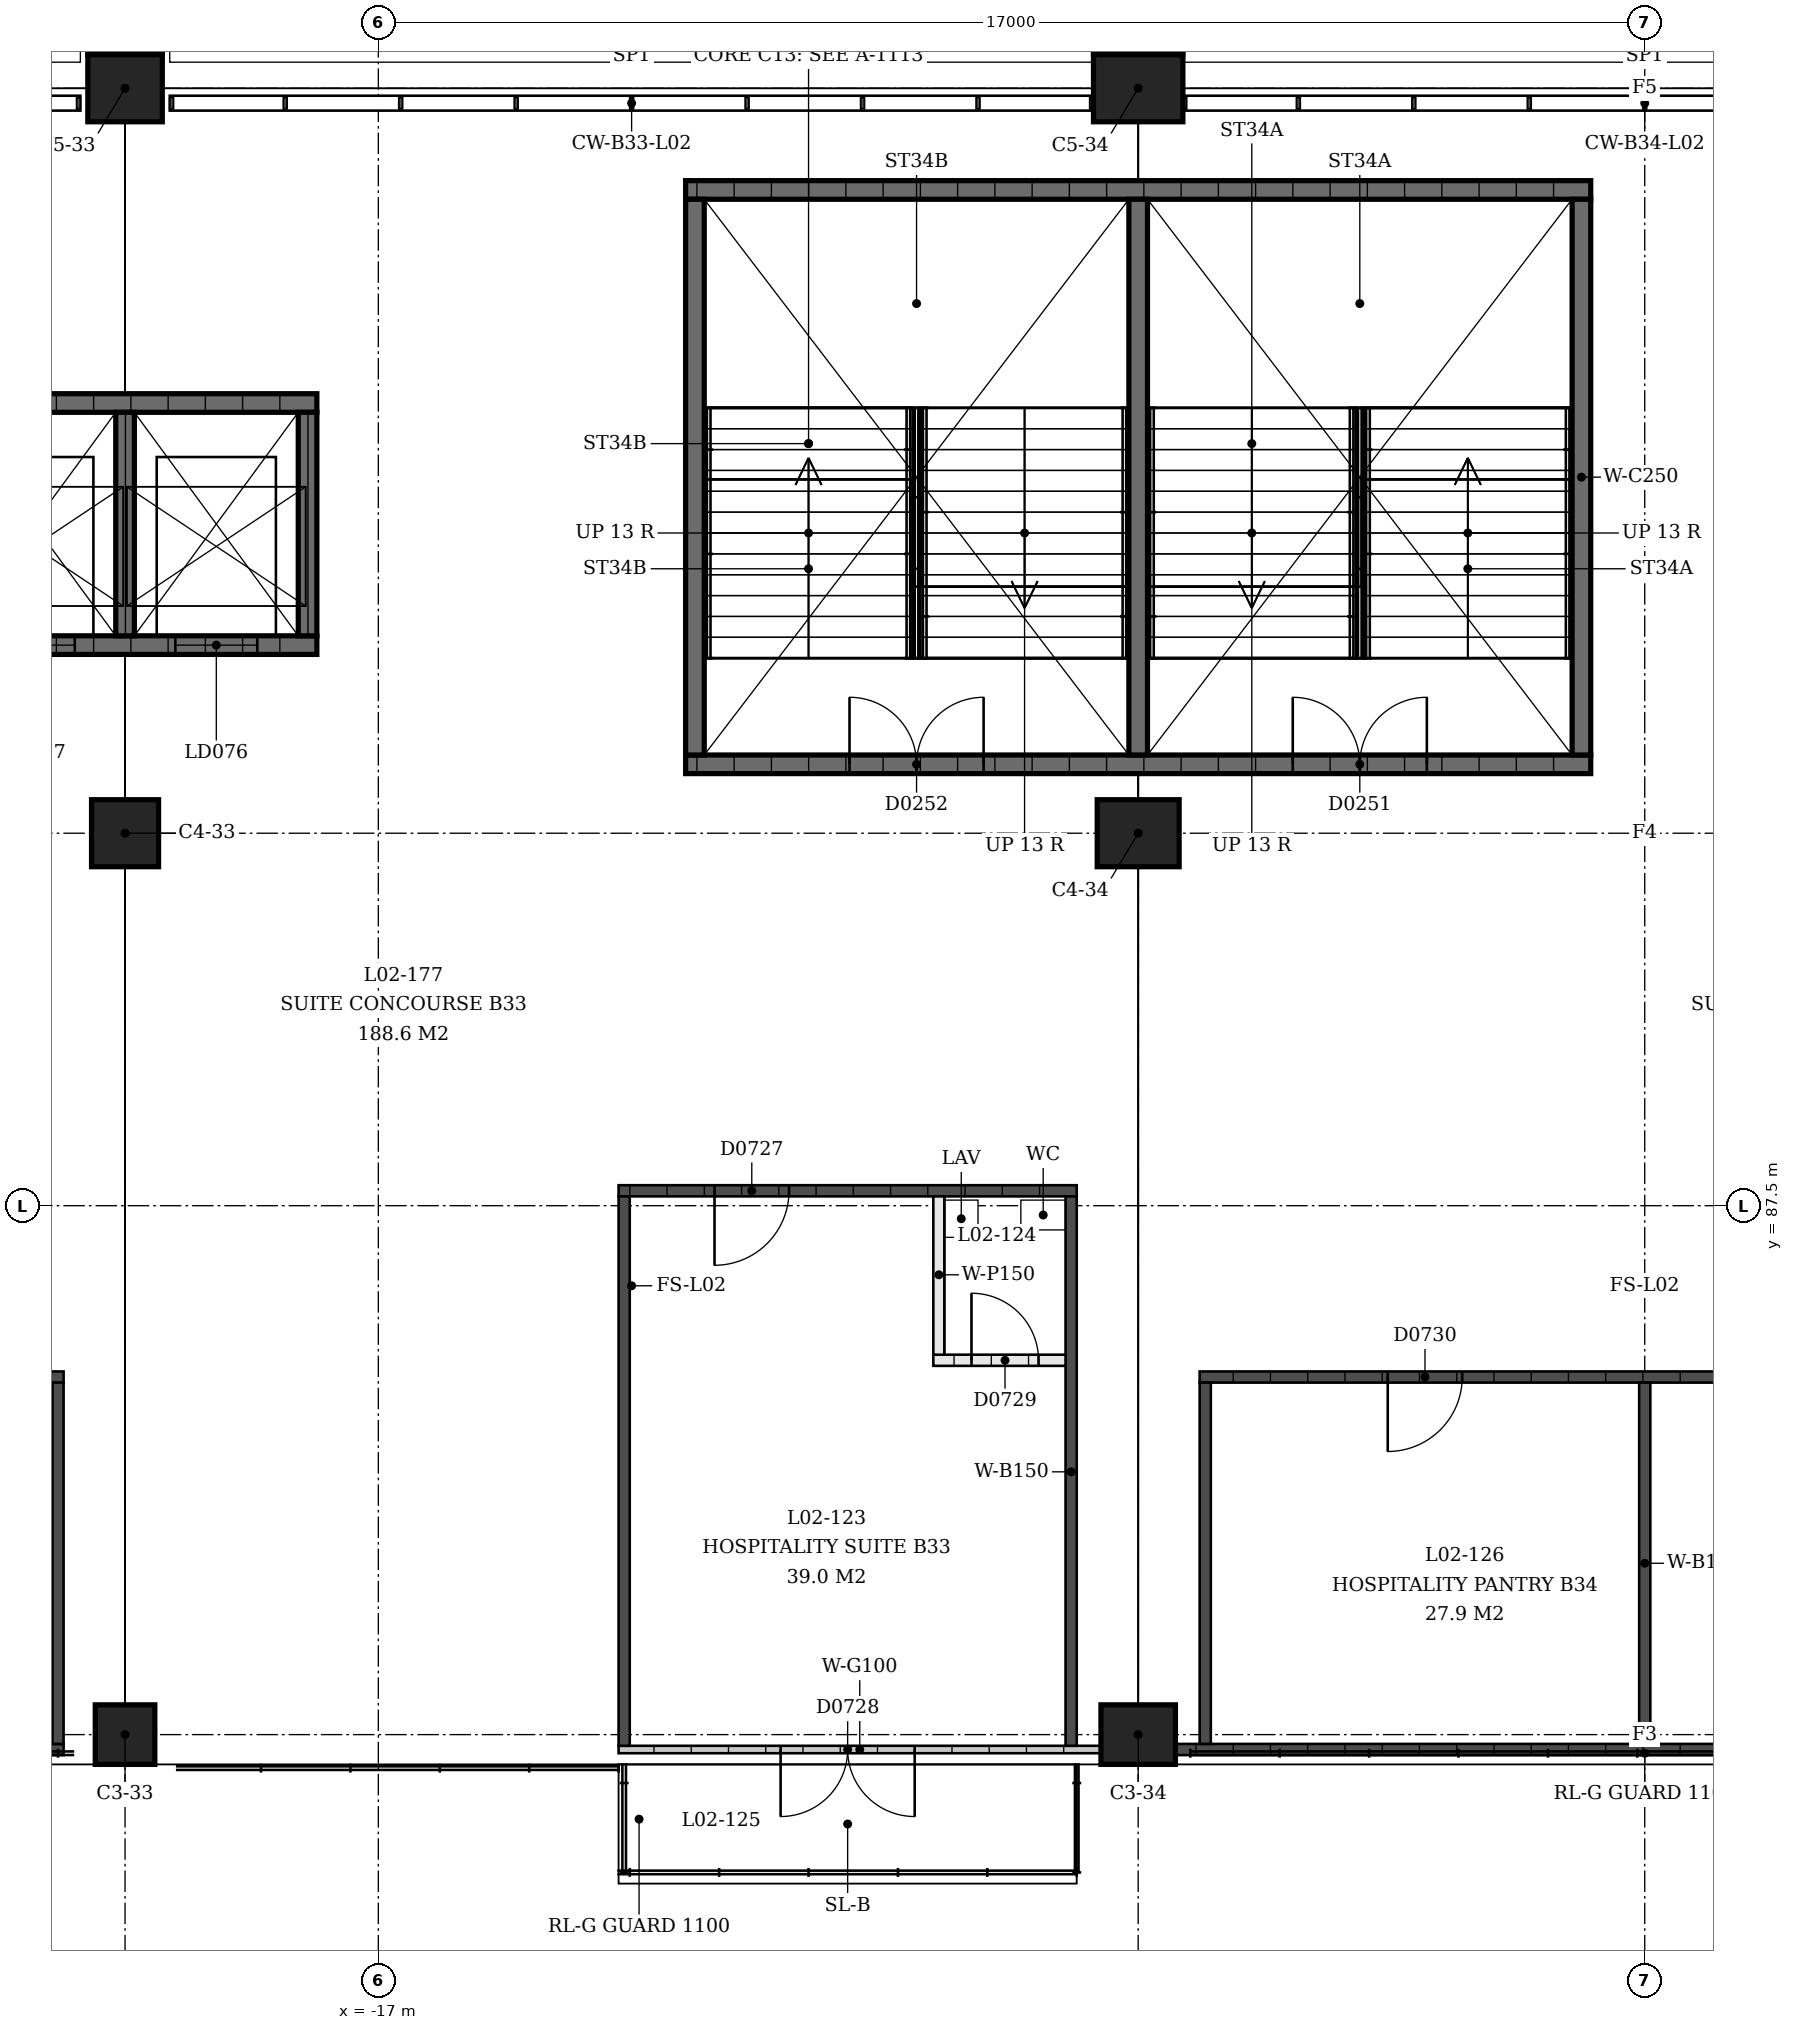
"""IFC4 building model, lengths in metres.
Left out: names, types, materials, properties, quantities, classifications, styles, units other than length and angle.
Written with IfcOpenShell. Run it as: python <this file> out.ifc"""

import sys

from ifc_helpers import new_model, si_unit, direction, frame, frame_2d, origin, origin_2d, place, context, subcontext, project, spatial, rectangle, extrude, element, fill, save


model = new_model("IFC4")
c1 = context("Model", 3, precision=1e-05, world=origin(), true_north=direction((0.0, 1.0)))
c2 = subcontext(c1, "Body", "Model", "MODEL_VIEW")
j1 = project(units=[si_unit("LENGTHUNIT", "METRE"), si_unit("PLANEANGLEUNIT", "RADIAN")], contexts=[c1])
p1 = place(None, origin())
s1 = spatial("IfcSite", under=j1, at=p1, CompositionType="ELEMENT")
p2 = place(p1, origin())
s2 = spatial("IfcBuilding", under=s1, at=p2, CompositionType="ELEMENT")
p3 = place(p2, frame((0.0, 0.0, 9.0)))
s3 = spatial("IfcBuildingStorey", under=s2, at=p3, CompositionType="ELEMENT", Elevation=9.0)
p4 = place(p3, frame((-20.4, 80.4, 0.0), z_axis=(0.0, 0.0, 1.0), x_axis=(-1.0, 0.0, 0.0)))
e1 = element("IfcColumn", 1, at=p4, inside=s3, PredefinedType="COLUMN", context=c2, shape_type="SweptSolid", body=[
    extrude(rectangle(XDim=0.8, YDim=0.8, at=origin_2d()), origin(), (0.0, 0.0, 1.0), 4.5),
])
p5 = place(p3, frame((-20.4, 92.5, 0.0), z_axis=(0.0, 0.0, 1.0), x_axis=(-1.0, 0.0, 0.0)))
e2 = element("IfcColumn", 2, at=p5, inside=s3, PredefinedType="COLUMN", context=c2, shape_type="SweptSolid", body=[
    extrude(rectangle(XDim=0.9, YDim=0.9, at=origin_2d()), origin(), (0.0, 0.0, 1.0), 4.5),
])
p6 = place(p3, frame((-20.4, 102.5, 0.0), z_axis=(0.0, 0.0, 1.0), x_axis=(-1.0, 0.0, 0.0)))
e3 = element("IfcColumn", 3, at=p6, inside=s3, PredefinedType="COLUMN", context=c2, shape_type="SweptSolid", body=[
    extrude(rectangle(XDim=1.0, YDim=0.9, at=origin_2d()), origin(), (0.0, 0.0, 1.0), 4.5),
])
p7 = place(p3, frame((-6.8, 80.4, 0.0), z_axis=(0.0, 0.0, 1.0), x_axis=(-1.0, 0.0, 0.0)))
e4 = element("IfcColumn", 4, at=p7, inside=s3, PredefinedType="COLUMN", context=c2, shape_type="SweptSolid", body=[
    extrude(rectangle(XDim=1.0, YDim=0.8, at=origin_2d()), origin(), (0.0, 0.0, 1.0), 4.5),
])
p8 = place(p3, frame((-6.8, 92.5, 0.0), z_axis=(0.0, 0.0, 1.0), x_axis=(-1.0, 0.0, 0.0)))
e5 = element("IfcColumn", 5, at=p8, inside=s3, PredefinedType="COLUMN", context=c2, shape_type="SweptSolid", body=[
    extrude(rectangle(XDim=1.1, YDim=0.9, at=origin_2d()), origin(), (0.0, 0.0, 1.0), 4.5),
])
p9 = place(p3, frame((-6.8, 102.5, 0.0), z_axis=(0.0, 0.0, 1.0), x_axis=(-1.0, 0.0, 0.0)))
e6 = element("IfcColumn", 6, at=p9, inside=s3, PredefinedType="COLUMN", context=c2, shape_type="SweptSolid", body=[
    extrude(rectangle(XDim=1.2, YDim=0.9, at=origin_2d()), origin(), (0.0, 0.0, 1.0), 4.5),
])
p10 = place(p3, frame((-0.725, 93.425, 0.0), z_axis=(0.0, 0.0, 1.0), x_axis=(-1.0, 0.0, 0.0)))
e7 = element("IfcWall", 7, at=p10, inside=s3, PredefinedType="SHEAR", context=c2, shape_type="SweptSolid", body=[
    extrude(rectangle(XDim=12.15, YDim=0.25, at=frame_2d((6.075, 0.0))), origin(), (0.0, 0.0, 1.0), 4.09),
])
p11 = place(p10, frame((2.2, 0.0, 0.0)))
e8 = element("IfcOpeningElement", 8, at=p11, cuts=e7, PredefinedType="OPENING", context=c2, shape_type="SweptSolid", body=[
    extrude(rectangle(XDim=1.8, YDim=2.1, at=frame_2d((0.9, 1.05))), frame((0.0, 0.125, 0.0), z_axis=(0.0, -1.0, 0.0), x_axis=(1.0, 0.0, 0.0)), (0.0, 0.0, 1.0), 0.25),
])
p12 = place(p10, frame((8.15, 0.0, 0.0)))
e9 = element("IfcOpeningElement", 9, at=p12, cuts=e7, PredefinedType="OPENING", context=c2, shape_type="SweptSolid", body=[
    extrude(rectangle(XDim=1.8, YDim=2.1, at=frame_2d((0.9, 1.05))), frame((0.0, 0.125, 0.0), z_axis=(0.0, -1.0, 0.0), x_axis=(1.0, 0.0, 0.0)), (0.0, 0.0, 1.0), 0.25),
])
p13 = place(p3, frame((-0.725, 101.135, 0.0), z_axis=(0.0, 0.0, 1.0), x_axis=(-1.0, 0.0, 0.0)))
e10 = element("IfcWall", 10, at=p13, inside=s3, PredefinedType="SHEAR", context=c2, shape_type="SweptSolid", body=[
    extrude(rectangle(XDim=12.15, YDim=0.25, at=frame_2d((6.075, 0.0))), origin(), (0.0, 0.0, 1.0), 4.09),
])
for number, where, z_axis, x_axis in (
    (11, (-0.85, 93.55, 0.0), (0.0, 0.0, 1.0), (0.0, 1.0, 0.0)),
    (12, (-12.75, 93.55, 0.0), (0.0, 0.0, 1.0), (0.0, 1.0, 0.0)),
    (13, (-6.8, 93.55, 0.0), (0.0, 0.0, 1.0), (0.0, 1.0, 0.0)),
):
    element("IfcWall", number, at=place(p3, frame(where, z_axis=z_axis, x_axis=x_axis)), inside=s3, PredefinedType="SHEAR", context=c2, shape_type="SweptSolid", body=[
        extrude(rectangle(XDim=7.46, YDim=0.25, at=frame_2d((3.73, 0.0))), origin(), (0.0, 0.0, 1.0), 4.09),
    ])
p14 = place(p3, frame((-17.825, 95.025, 0.0), z_axis=(0.0, 0.0, 1.0), x_axis=(-1.0, 0.0, 0.0)))
e14 = element("IfcWall", 14, at=p14, inside=s3, PredefinedType="SHEAR", context=c2, shape_type="SweptSolid", body=[
    extrude(rectangle(XDim=5.15, YDim=0.25, at=frame_2d((2.575, 0.0))), origin(), (0.0, 0.0, 1.0), 4.09),
])
p15 = place(p14, frame((0.8, 0.0, 0.0)))
e15 = element("IfcOpeningElement", 15, at=p15, cuts=e14, PredefinedType="OPENING", context=c2, shape_type="SweptSolid", body=[
    extrude(rectangle(XDim=1.1, YDim=2.1, at=frame_2d((0.55, 1.05))), frame((0.0, 0.125, 0.0), z_axis=(0.0, -1.0, 0.0), x_axis=(1.0, 0.0, 0.0)), (0.0, 0.0, 1.0), 0.25),
])
p16 = place(p14, frame((3.25, 0.0, 0.0)))
e16 = element("IfcOpeningElement", 16, at=p16, cuts=e14, PredefinedType="OPENING", context=c2, shape_type="SweptSolid", body=[
    extrude(rectangle(XDim=1.1, YDim=2.1, at=frame_2d((0.55, 1.05))), frame((0.0, 0.125, 0.0), z_axis=(0.0, -1.0, 0.0), x_axis=(1.0, 0.0, 0.0)), (0.0, 0.0, 1.0), 0.25),
])
p17 = place(p3, frame((-17.825, 98.275, 0.0), z_axis=(0.0, 0.0, 1.0), x_axis=(-1.0, 0.0, 0.0)))
e17 = element("IfcWall", 17, at=p17, inside=s3, PredefinedType="SHEAR", context=c2, shape_type="SweptSolid", body=[
    extrude(rectangle(XDim=5.15, YDim=0.25, at=frame_2d((2.575, 0.0))), origin(), (0.0, 0.0, 1.0), 4.09),
])
for number, where, z_axis, x_axis in (
    (18, (-17.95, 95.15, 0.0), (0.0, 0.0, 1.0), (0.0, 1.0, 0.0)),
    (19, (-20.4, 95.15, 0.0), (0.0, 0.0, 1.0), (0.0, 1.0, 0.0)),
):
    element("IfcWall", number, at=place(p3, frame(where, z_axis=z_axis, x_axis=x_axis)), inside=s3, PredefinedType="SHEAR", context=c2, shape_type="SweptSolid", body=[
        extrude(rectangle(XDim=3.0, YDim=0.25, at=frame_2d((1.5, 0.0))), origin(), (0.0, 0.0, 1.0), 4.09),
    ])
p18 = place(p3, frame((-33.5, 80.2, 0.0), z_axis=(0.0, 0.0, 1.0), x_axis=(1.0, 0.0, 0.0)))
e20 = element("IfcWall", 20, at=p18, inside=s3, PredefinedType="SOLIDWALL", context=c2, shape_type="SweptSolid", body=[
    extrude(rectangle(XDim=12.275, YDim=0.15, at=frame_2d((6.137, 0.0))), origin(), (0.0, 0.0, 1.0), 3.0),
])
p19 = place(p3, frame((-33.175, 85.2, 0.0), z_axis=(0.0, 0.0, 1.0), x_axis=(1.0, 0.0, 0.0)))
e21 = element("IfcWall", 21, at=p19, inside=s3, PredefinedType="SOLIDWALL", context=c2, shape_type="SweptSolid", body=[
    extrude(rectangle(XDim=11.95, YDim=0.15, at=frame_2d((5.975, 0.0))), origin(), (0.0, 0.0, 1.0), 3.0),
])
p20 = place(p19, frame((2.525, 0.0, 0.0)))
e22 = element("IfcOpeningElement", 22, at=p20, cuts=e21, PredefinedType="OPENING", context=c2, shape_type="SweptSolid", body=[
    extrude(rectangle(XDim=1.0, YDim=2.1, at=frame_2d((0.5, 1.05))), frame((0.0, 0.075, 0.0), z_axis=(0.0, -1.0, 0.0), x_axis=(1.0, 0.0, 0.0)), (0.0, 0.0, 1.0), 0.15),
])
p21 = place(p19, frame((8.425, 0.0, 0.0)))
e23 = element("IfcOpeningElement", 23, at=p21, cuts=e21, PredefinedType="OPENING", context=c2, shape_type="SweptSolid", body=[
    extrude(rectangle(XDim=1.0, YDim=2.1, at=frame_2d((0.5, 1.05))), frame((0.0, 0.075, 0.0), z_axis=(0.0, -1.0, 0.0), x_axis=(1.0, 0.0, 0.0)), (0.0, 0.0, 1.0), 0.15),
])
p22 = place(p3, frame((-21.3, 80.275, 0.0), z_axis=(0.0, 0.0, 1.0), x_axis=(0.0, 1.0, 0.0)))
e24 = element("IfcWall", 24, at=p22, inside=s3, PredefinedType="SOLIDWALL", context=c2, shape_type="SweptSolid", body=[
    extrude(rectangle(XDim=4.85, YDim=0.15, at=frame_2d((2.425, 0.0))), origin(), (0.0, 0.0, 1.0), 3.0),
])
p23 = place(p3, frame((-7.3, 80.2, 0.0), z_axis=(0.0, 0.0, 1.0), x_axis=(-1.0, 0.0, 0.0)))
e25 = element("IfcWall", 25, at=p23, inside=s3, PredefinedType="PARTITIONING", context=c2, shape_type="SweptSolid", body=[
    extrude(rectangle(XDim=6.475, YDim=0.1, at=frame_2d((3.237, 0.0))), origin(), (0.0, 0.0, 1.0), 3.0),
])
p24 = place(p23, frame((2.5, 0.0, 0.0)))
e26 = element("IfcOpeningElement", 26, at=p24, cuts=e25, PredefinedType="OPENING", context=c2, shape_type="SweptSolid", body=[
    extrude(rectangle(XDim=1.8, YDim=2.1, at=frame_2d((0.9, 1.05))), frame((0.0, 0.05, 0.0), z_axis=(0.0, -1.0, 0.0), x_axis=(1.0, 0.0, 0.0)), (0.0, 0.0, 1.0), 0.1),
])
p25 = place(p3, frame((-7.625, 87.7, 0.0), z_axis=(0.0, 0.0, 1.0), x_axis=(-1.0, 0.0, 0.0)))
e27 = element("IfcWall", 27, at=p25, inside=s3, PredefinedType="SOLIDWALL", context=c2, shape_type="SweptSolid", body=[
    extrude(rectangle(XDim=6.15, YDim=0.15, at=frame_2d((3.075, 0.0))), origin(), (0.0, 0.0, 1.0), 3.0),
])
p26 = place(p25, frame((3.862, 0.0, 0.0)))
e28 = element("IfcOpeningElement", 28, at=p26, cuts=e27, PredefinedType="OPENING", context=c2, shape_type="SweptSolid", body=[
    extrude(rectangle(XDim=1.0, YDim=2.1, at=frame_2d((0.5, 1.05))), frame((0.0, 0.075, 0.0), z_axis=(0.0, -1.0, 0.0), x_axis=(1.0, 0.0, 0.0)), (0.0, 0.0, 1.0), 0.15),
])
for number, where, z_axis, x_axis in (
    (29, (-7.7, 80.25, 0.0), (0.0, 0.0, 1.0), (0.0, 1.0, 0.0)),
    (30, (-13.7, 80.25, 0.0), (0.0, 0.0, 1.0), (0.0, 1.0, 0.0)),
):
    element("IfcWall", number, at=place(p3, frame(where, z_axis=z_axis, x_axis=x_axis)), inside=s3, PredefinedType="SOLIDWALL", context=c2, shape_type="SweptSolid", body=[
        extrude(rectangle(XDim=7.375, YDim=0.15, at=frame_2d((3.688, 0.0))), origin(), (0.0, 0.0, 1.0), 3.0),
    ])
p27 = place(p3, frame((-7.775, 85.425, 0.0), z_axis=(0.0, 0.0, 1.0), x_axis=(-1.0, 0.0, 0.0)))
e31 = element("IfcWall", 31, at=p27, inside=s3, PredefinedType="PARTITIONING", context=c2, shape_type="SweptSolid", body=[
    extrude(rectangle(XDim=1.775, YDim=0.15, at=frame_2d((0.888, 0.0))), origin(), (0.0, 0.0, 1.0), 3.0),
])
p28 = place(p27, frame((0.363, 0.0, 0.0)))
e32 = element("IfcOpeningElement", 32, at=p28, cuts=e31, PredefinedType="OPENING", context=c2, shape_type="SweptSolid", body=[
    extrude(rectangle(XDim=0.9, YDim=2.1, at=frame_2d((0.45, 1.05))), frame((0.0, 0.075, 0.0), z_axis=(0.0, -1.0, 0.0), x_axis=(1.0, 0.0, 0.0)), (0.0, 0.0, 1.0), 0.15),
])
p29 = place(p3, frame((-9.475, 85.5, 0.0), z_axis=(0.0, 0.0, 1.0), x_axis=(0.0, 1.0, 0.0)))
e33 = element("IfcWall", 33, at=p29, inside=s3, PredefinedType="PARTITIONING", context=c2, shape_type="SweptSolid", body=[
    extrude(rectangle(XDim=2.125, YDim=0.15, at=frame_2d((1.062, 0.0))), origin(), (0.0, 0.0, 1.0), 3.0),
])
p30 = place(p3, frame((-6.3, 80.2, 0.0), z_axis=(0.0, 0.0, 1.0), x_axis=(1.0, 0.0, 0.0)))
e34 = element("IfcWall", 34, at=p30, inside=s3, PredefinedType="SOLIDWALL", context=c2, shape_type="SweptSolid", body=[
    extrude(rectangle(XDim=12.275, YDim=0.15, at=frame_2d((6.138, 0.0))), origin(), (0.0, 0.0, 1.0), 3.0),
])
p31 = place(p3, frame((-5.975, 85.2, 0.0), z_axis=(0.0, 0.0, 1.0), x_axis=(1.0, 0.0, 0.0)))
e35 = element("IfcWall", 35, at=p31, inside=s3, PredefinedType="SOLIDWALL", context=c2, shape_type="SweptSolid", body=[
    extrude(rectangle(XDim=11.95, YDim=0.15, at=frame_2d((5.975, 0.0))), origin(), (0.0, 0.0, 1.0), 3.0),
])
p32 = place(p31, frame((2.525, 0.0, 0.0)))
e36 = element("IfcOpeningElement", 36, at=p32, cuts=e35, PredefinedType="OPENING", context=c2, shape_type="SweptSolid", body=[
    extrude(rectangle(XDim=1.0, YDim=2.1, at=frame_2d((0.5, 1.05))), frame((0.0, 0.075, 0.0), z_axis=(0.0, -1.0, 0.0), x_axis=(1.0, 0.0, 0.0)), (0.0, 0.0, 1.0), 0.15),
])
p33 = place(p31, frame((8.425, 0.0, 0.0)))
e37 = element("IfcOpeningElement", 37, at=p33, cuts=e35, PredefinedType="OPENING", context=c2, shape_type="SweptSolid", body=[
    extrude(rectangle(XDim=1.0, YDim=2.1, at=frame_2d((0.5, 1.05))), frame((0.0, 0.075, 0.0), z_axis=(0.0, -1.0, 0.0), x_axis=(1.0, 0.0, 0.0)), (0.0, 0.0, 1.0), 0.15),
])
for number, where, z_axis, x_axis in (
    (38, (-5.9, 80.275, 0.0), (0.0, 0.0, 1.0), (0.0, 1.0, 0.0)),
    (39, (0.0, 80.275, 0.0), (0.0, 0.0, 1.0), (0.0, 1.0, 0.0)),
):
    element("IfcWall", number, at=place(p3, frame(where, z_axis=z_axis, x_axis=x_axis)), inside=s3, PredefinedType="SOLIDWALL", context=c2, shape_type="SweptSolid", body=[
        extrude(rectangle(XDim=4.85, YDim=0.15, at=frame_2d((2.425, 0.0))), origin(), (0.0, 0.0, 1.0), 3.0),
    ])
p34 = place(p11, origin())
e40 = element("IfcDoor", 40, at=p34, inside=s3, OperationType="DOUBLE_DOOR_SINGLE_SWING", PredefinedType="DOOR", context=c2, shape_type="SweptSolid", body=[
    extrude(rectangle(XDim=1.8, YDim=2.1, at=frame_2d((0.9, 1.05))), frame((0.0, 0.025, 0.0), z_axis=(0.0, -1.0, 0.0), x_axis=(1.0, 0.0, 0.0)), (0.0, 0.0, 1.0), 0.05),
])
fill(e8, e40)
p35 = place(p12, origin())
e41 = element("IfcDoor", 41, at=p35, inside=s3, OperationType="DOUBLE_DOOR_SINGLE_SWING", PredefinedType="DOOR", context=c2, shape_type="SweptSolid", body=[
    extrude(rectangle(XDim=1.8, YDim=2.1, at=frame_2d((0.9, 1.05))), frame((0.0, 0.025, 0.0), z_axis=(0.0, -1.0, 0.0), x_axis=(1.0, 0.0, 0.0)), (0.0, 0.0, 1.0), 0.05),
])
fill(e9, e41)
p36 = place(p15, origin())
e42 = element("IfcDoor", 42, at=p36, inside=s3, OperationType="SLIDING_TO_LEFT", PredefinedType="DOOR", context=c2, shape_type="SweptSolid", body=[
    extrude(rectangle(XDim=1.1, YDim=2.1, at=frame_2d((0.55, 1.05))), frame((0.0, 0.025, 0.0), z_axis=(0.0, -1.0, 0.0), x_axis=(1.0, 0.0, 0.0)), (0.0, 0.0, 1.0), 0.05),
])
fill(e15, e42)
p37 = place(p16, origin())
e43 = element("IfcDoor", 43, at=p37, inside=s3, OperationType="SLIDING_TO_LEFT", PredefinedType="DOOR", context=c2, shape_type="SweptSolid", body=[
    extrude(rectangle(XDim=1.1, YDim=2.1, at=frame_2d((0.55, 1.05))), frame((0.0, 0.025, 0.0), z_axis=(0.0, -1.0, 0.0), x_axis=(1.0, 0.0, 0.0)), (0.0, 0.0, 1.0), 0.05),
])
fill(e16, e43)
p38 = place(p26, origin())
e44 = element("IfcDoor", 44, at=p38, inside=s3, OperationType="SINGLE_SWING_LEFT", PredefinedType="DOOR", context=c2, shape_type="SweptSolid", body=[
    extrude(rectangle(XDim=1.0, YDim=2.1, at=frame_2d((0.5, 1.05))), frame((0.0, 0.025, 0.0), z_axis=(0.0, -1.0, 0.0), x_axis=(1.0, 0.0, 0.0)), (0.0, 0.0, 1.0), 0.05),
])
fill(e28, e44)
p39 = place(p24, origin())
e45 = element("IfcDoor", 45, at=p39, inside=s3, OperationType="DOUBLE_DOOR_SINGLE_SWING", PredefinedType="DOOR", context=c2, shape_type="SweptSolid", body=[
    extrude(rectangle(XDim=1.8, YDim=2.1, at=frame_2d((0.9, 1.05))), frame((0.0, 0.025, 0.0), z_axis=(0.0, -1.0, 0.0), x_axis=(1.0, 0.0, 0.0)), (0.0, 0.0, 1.0), 0.05),
])
fill(e26, e45)
p40 = place(p28, origin())
e46 = element("IfcDoor", 46, at=p40, inside=s3, OperationType="SINGLE_SWING_RIGHT", PredefinedType="DOOR", context=c2, shape_type="SweptSolid", body=[
    extrude(rectangle(XDim=0.9, YDim=2.1, at=frame_2d((0.45, 1.05))), frame((0.0, 0.025, 0.0), z_axis=(0.0, -1.0, 0.0), x_axis=(1.0, 0.0, 0.0)), (0.0, 0.0, 1.0), 0.05),
])
fill(e32, e46)
p41 = place(p32, origin())
e47 = element("IfcDoor", 47, at=p41, inside=s3, OperationType="SINGLE_SWING_LEFT", PredefinedType="DOOR", context=c2, shape_type="SweptSolid", body=[
    extrude(rectangle(XDim=1.0, YDim=2.1, at=frame_2d((0.5, 1.05))), frame((0.0, 0.025, 0.0), z_axis=(0.0, -1.0, 0.0), x_axis=(1.0, 0.0, 0.0)), (0.0, 0.0, 1.0), 0.05),
])
fill(e36, e47)
save(model, sys.argv[1])
